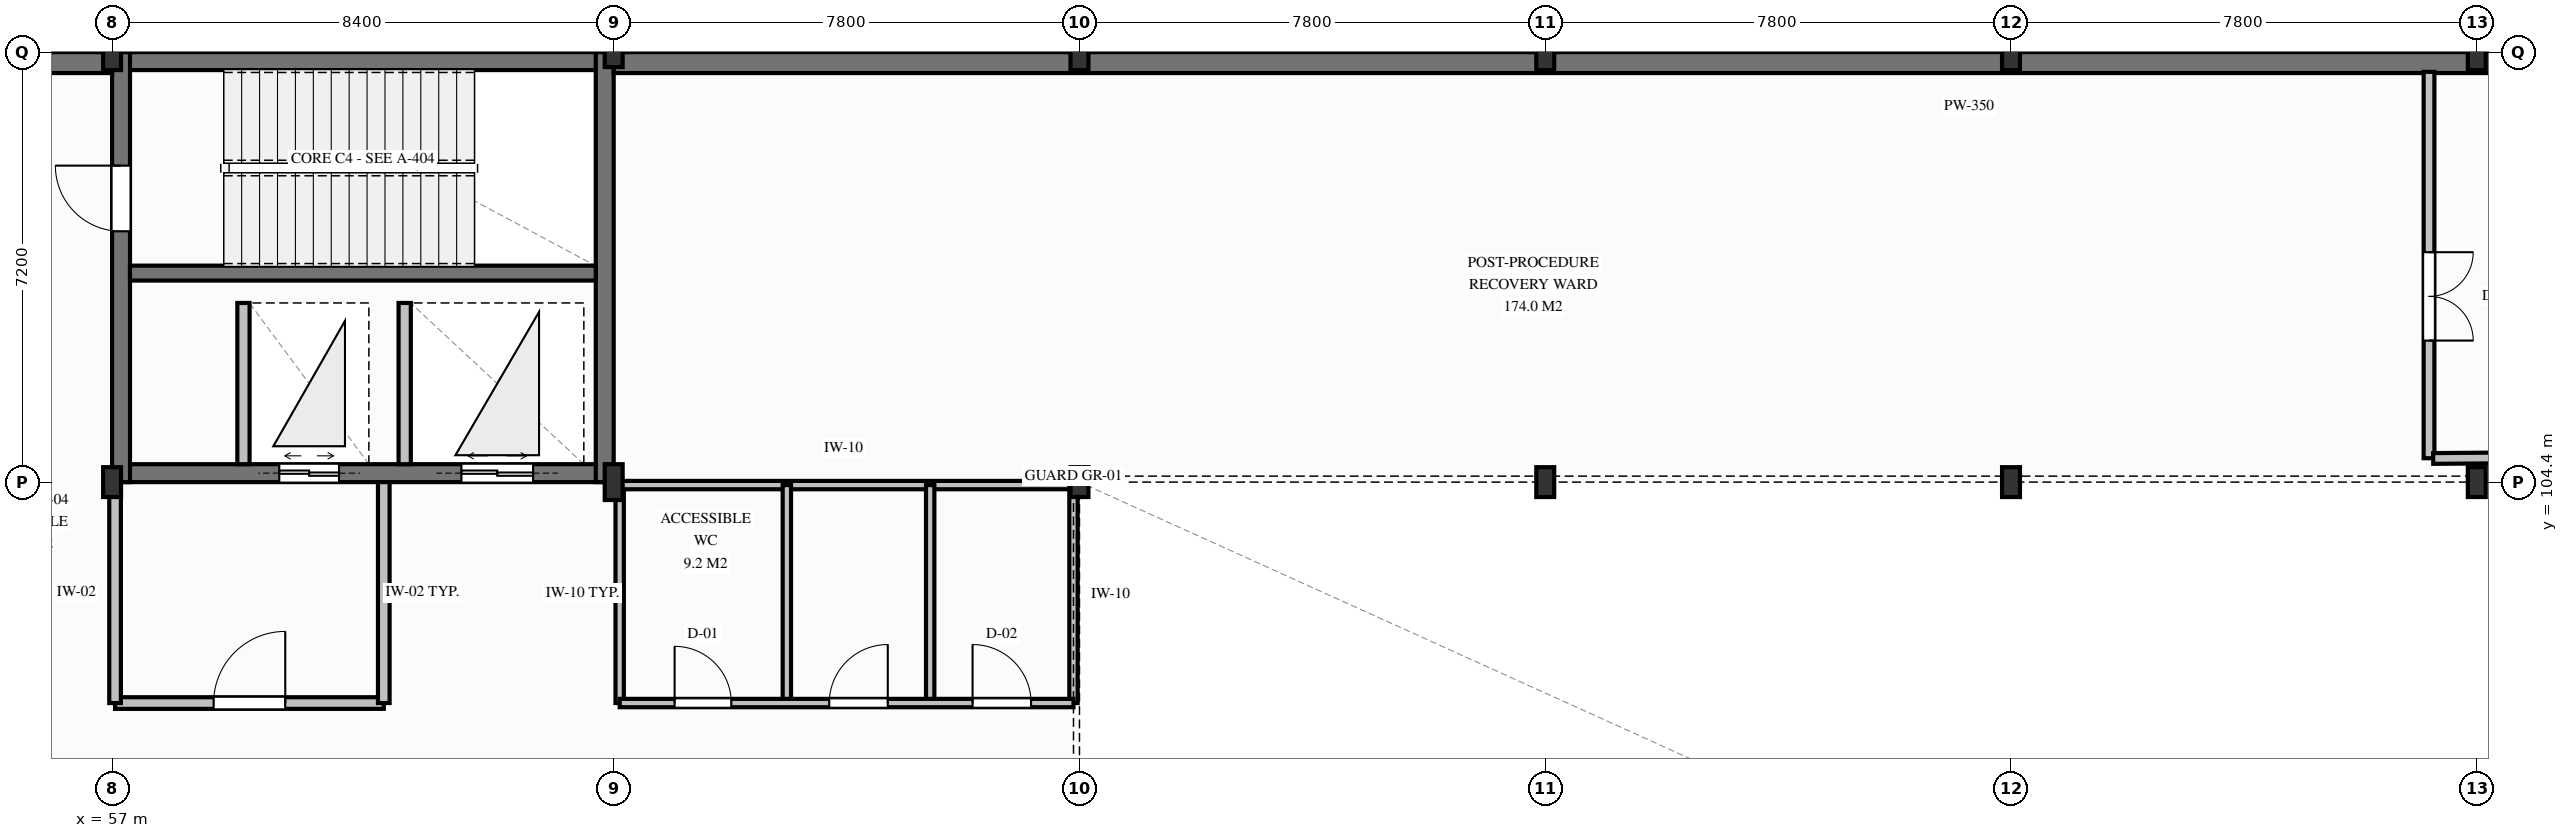
"""IFC4 building model, lengths in metres.
Left out: names, types, materials, properties, quantities, classifications, styles, units other than length and angle.
Written with IfcOpenShell. Run it as: python <this file> out.ifc"""

import sys

from ifc_helpers import new_model, si_unit, direction, frame, frame_2d, origin, origin_2d, place, context, subcontext, project, spatial, rectangle, i_section, extrude, element, fill, save


model = new_model("IFC4")
c1 = context("Model", 3, precision=1e-05, world=origin(), true_north=direction((0.0, 1.0)))
c2 = subcontext(c1, "Body", "Model", "MODEL_VIEW")
j1 = project(units=[si_unit("LENGTHUNIT", "METRE"), si_unit("PLANEANGLEUNIT", "RADIAN")], contexts=[c1])
p1 = place(None, origin())
s1 = spatial("IfcSite", under=j1, at=p1, CompositionType="ELEMENT")
p2 = place(p1, origin())
s2 = spatial("IfcBuilding", under=s1, at=p2, CompositionType="ELEMENT")
p3 = place(p2, frame((0.0, 0.0, 4.5)))
s3 = spatial("IfcBuildingStorey", under=s2, at=p3, CompositionType="ELEMENT", Elevation=4.5)
p4 = place(p3, frame((57.0, 111.45, 0.0), z_axis=(0.0, 0.0, 1.0), x_axis=(1.0, 0.0, 0.0)))
e1 = element("IfcWall", 1, at=p4, inside=s3, PredefinedType="SHEAR", context=c2, shape_type="SweptSolid", body=[
    extrude(rectangle(XDim=8.4, YDim=0.3, at=frame_2d((4.2, 0.0))), origin(), (0.0, 0.0, 1.0), 4.5),
])
p5 = place(p3, frame((57.0, 104.55, 0.0), z_axis=(0.0, 0.0, 1.0), x_axis=(1.0, 0.0, 0.0)))
e2 = element("IfcWall", 2, at=p5, inside=s3, PredefinedType="SHEAR", context=c2, shape_type="SweptSolid", body=[
    extrude(rectangle(XDim=8.4, YDim=0.3, at=frame_2d((4.2, 0.0))), origin(), (0.0, 0.0, 1.0), 4.5),
])
p6 = place(p5, frame((2.8, 0.0, 0.0)))
e3 = element("IfcOpeningElement", 3, at=p6, cuts=e2, PredefinedType="OPENING", context=c2, shape_type="SweptSolid", body=[
    extrude(rectangle(XDim=1.0, YDim=2.1, at=frame_2d((0.5, 1.05))), frame((0.0, 0.16, 0.0), z_axis=(0.0, -1.0, 0.0), x_axis=(1.0, 0.0, 0.0)), (0.0, 0.0, 1.0), 0.32),
])
p7 = place(p5, frame((5.85, 0.0, 0.0)))
e4 = element("IfcOpeningElement", 4, at=p7, cuts=e2, PredefinedType="OPENING", context=c2, shape_type="SweptSolid", body=[
    extrude(rectangle(XDim=1.2, YDim=2.15, at=frame_2d((0.6, 1.075))), frame((0.0, 0.16, 0.0), z_axis=(0.0, -1.0, 0.0), x_axis=(1.0, 0.0, 0.0)), (0.0, 0.0, 1.0), 0.32),
])
p8 = place(p3, frame((57.15, 104.4, 0.0), z_axis=(0.0, 0.0, 1.0), x_axis=(0.0, 1.0, 0.0)))
e5 = element("IfcWall", 5, at=p8, inside=s3, PredefinedType="SHEAR", context=c2, shape_type="SweptSolid", body=[
    extrude(rectangle(XDim=7.2, YDim=0.3, at=frame_2d((3.6, 0.0))), origin(), (0.0, 0.0, 1.0), 4.5),
])
p9 = place(p8, frame((4.2, 0.0, 0.0)))
e6 = element("IfcOpeningElement", 6, at=p9, cuts=e5, PredefinedType="OPENING", context=c2, shape_type="SweptSolid", body=[
    extrude(rectangle(XDim=1.1, YDim=2.15, at=frame_2d((0.55, 1.075))), frame((0.0, 0.16, 0.0), z_axis=(0.0, -1.0, 0.0), x_axis=(1.0, 0.0, 0.0)), (0.0, 0.0, 1.0), 0.32),
])
p10 = place(p3, frame((65.25, 104.4, 0.0), z_axis=(0.0, 0.0, 1.0), x_axis=(0.0, 1.0, 0.0)))
e7 = element("IfcWall", 7, at=p10, inside=s3, PredefinedType="SHEAR", context=c2, shape_type="SweptSolid", body=[
    extrude(rectangle(XDim=7.2, YDim=0.3, at=frame_2d((3.6, 0.0))), origin(), (0.0, 0.0, 1.0), 4.5),
])
p11 = place(p3, frame((57.3, 107.9, 0.0), z_axis=(0.0, 0.0, 1.0), x_axis=(1.0, 0.0, 0.0)))
e8 = element("IfcWall", 8, at=p11, inside=s3, PredefinedType="SHEAR", context=c2, shape_type="SweptSolid", body=[
    extrude(rectangle(XDim=7.8, YDim=0.25, at=frame_2d((3.9, 0.0))), origin(), (0.0, 0.0, 1.0), 4.5),
])
p12 = place(p3, frame((49.2, 111.425, 0.0), z_axis=(0.0, 0.0, 1.0), x_axis=(1.0, 0.0, 0.0)))
e9 = element("IfcWall", 9, at=p12, inside=s3, PredefinedType="SHEAR", context=c2, shape_type="SweptSolid", body=[
    extrude(rectangle(XDim=7.8, YDim=0.35, at=frame_2d((3.9, 0.0))), origin(), (0.0, 0.0, 1.0), 4.5),
])
p13 = place(p3, frame((65.4, 111.425, 0.0), z_axis=(0.0, 0.0, 1.0), x_axis=(1.0, 0.0, 0.0)))
e10 = element("IfcWall", 10, at=p13, inside=s3, PredefinedType="SHEAR", context=c2, shape_type="SweptSolid", body=[
    extrude(rectangle(XDim=48.0, YDim=0.35, at=frame_2d((24.0, 0.0))), origin(), (0.0, 0.0, 1.0), 4.5),
])
p14 = place(p3, frame((57.0, 104.4, 0.0), z_axis=(0.0, 0.0, 1.0), x_axis=(1.0, 0.0, 0.0)))
e11 = element("IfcColumn", 11, at=p14, inside=s3, PredefinedType="COLUMN", context=c2, shape_type="SweptSolid", body=[
    extrude(i_section(OverallWidth=0.3, OverallDepth=0.5, WebThickness=0.014, FlangeThickness=0.028, FilletRadius=0.027, at=origin_2d()), origin(), (0.0, 0.0, 1.0), 4.5),
])
for number, where, z_axis, x_axis in (
    (12, (57.0, 111.6, 0.0), (0.0, 0.0, 1.0), (1.0, 0.0, 0.0)),
    (13, (65.4, 104.4, 0.0), (0.0, 0.0, 1.0), (1.0, 0.0, 0.0)),
):
    element("IfcColumn", number, at=place(p3, frame(where, z_axis=z_axis, x_axis=x_axis)), inside=s3, PredefinedType="COLUMN", context=c2, shape_type="SweptSolid", body=[
        extrude(i_section(OverallWidth=0.3, OverallDepth=0.6, WebThickness=0.015, FlangeThickness=0.03, FilletRadius=0.027, at=origin_2d()), origin(), (0.0, 0.0, 1.0), 4.5),
    ])
for number, where, z_axis, x_axis in (
    (14, (65.4, 111.6, 0.0), (0.0, 0.0, 1.0), (1.0, 0.0, 0.0)),
    (15, (73.2, 104.4, 0.0), (0.0, 0.0, 1.0), (1.0, 0.0, 0.0)),
):
    element("IfcColumn", number, at=place(p3, frame(where, z_axis=z_axis, x_axis=x_axis)), inside=s3, PredefinedType="COLUMN", context=c2, shape_type="SweptSolid", body=[
        extrude(i_section(OverallWidth=0.3, OverallDepth=0.5, WebThickness=0.014, FlangeThickness=0.028, FilletRadius=0.027, at=origin_2d()), origin(), (0.0, 0.0, 1.0), 4.5),
    ])
p15 = place(p3, frame((73.2, 111.6, 0.0), z_axis=(0.0, 0.0, 1.0), x_axis=(1.0, 0.0, 0.0)))
e16 = element("IfcColumn", 16, at=p15, inside=s3, PredefinedType="COLUMN", context=c2, shape_type="SweptSolid", body=[
    extrude(i_section(OverallWidth=0.3, OverallDepth=0.6, WebThickness=0.015, FlangeThickness=0.03, FilletRadius=0.027, at=origin_2d()), origin(), (0.0, 0.0, 1.0), 4.5),
])
p16 = place(p3, frame((81.0, 104.4, 0.0), z_axis=(0.0, 0.0, 1.0), x_axis=(1.0, 0.0, 0.0)))
e17 = element("IfcColumn", 17, at=p16, inside=s3, PredefinedType="COLUMN", context=c2, shape_type="SweptSolid", body=[
    extrude(i_section(OverallWidth=0.3, OverallDepth=0.5, WebThickness=0.014, FlangeThickness=0.028, FilletRadius=0.027, at=origin_2d()), origin(), (0.0, 0.0, 1.0), 4.5),
])
p17 = place(p3, frame((81.0, 111.6, 0.0), z_axis=(0.0, 0.0, 1.0), x_axis=(1.0, 0.0, 0.0)))
e18 = element("IfcColumn", 18, at=p17, inside=s3, PredefinedType="COLUMN", context=c2, shape_type="SweptSolid", body=[
    extrude(i_section(OverallWidth=0.3, OverallDepth=0.6, WebThickness=0.015, FlangeThickness=0.03, FilletRadius=0.027, at=origin_2d()), origin(), (0.0, 0.0, 1.0), 4.5),
])
p18 = place(p3, frame((88.8, 104.4, 0.0), z_axis=(0.0, 0.0, 1.0), x_axis=(1.0, 0.0, 0.0)))
e19 = element("IfcColumn", 19, at=p18, inside=s3, PredefinedType="COLUMN", context=c2, shape_type="SweptSolid", body=[
    extrude(i_section(OverallWidth=0.3, OverallDepth=0.5, WebThickness=0.014, FlangeThickness=0.028, FilletRadius=0.027, at=origin_2d()), origin(), (0.0, 0.0, 1.0), 4.5),
])
p19 = place(p3, frame((88.8, 111.6, 0.0), z_axis=(0.0, 0.0, 1.0), x_axis=(1.0, 0.0, 0.0)))
e20 = element("IfcColumn", 20, at=p19, inside=s3, PredefinedType="COLUMN", context=c2, shape_type="SweptSolid", body=[
    extrude(i_section(OverallWidth=0.3, OverallDepth=0.6, WebThickness=0.015, FlangeThickness=0.03, FilletRadius=0.027, at=origin_2d()), origin(), (0.0, 0.0, 1.0), 4.5),
])
p20 = place(p3, frame((96.6, 104.4, 0.0), z_axis=(0.0, 0.0, 1.0), x_axis=(1.0, 0.0, 0.0)))
e21 = element("IfcColumn", 21, at=p20, inside=s3, PredefinedType="COLUMN", context=c2, shape_type="SweptSolid", body=[
    extrude(i_section(OverallWidth=0.3, OverallDepth=0.5, WebThickness=0.014, FlangeThickness=0.028, FilletRadius=0.027, at=origin_2d()), origin(), (0.0, 0.0, 1.0), 4.5),
])
p21 = place(p3, frame((96.6, 111.6, 0.0), z_axis=(0.0, 0.0, 1.0), x_axis=(1.0, 0.0, 0.0)))
e22 = element("IfcColumn", 22, at=p21, inside=s3, PredefinedType="COLUMN", context=c2, shape_type="SweptSolid", body=[
    extrude(i_section(OverallWidth=0.3, OverallDepth=0.6, WebThickness=0.015, FlangeThickness=0.03, FilletRadius=0.027, at=origin_2d()), origin(), (0.0, 0.0, 1.0), 4.5),
])
for number, where, z_axis, x_axis in (
    (23, (59.2, 104.7, 0.0), (0.0, 0.0, 1.0), (0.0, 1.0, 0.0)),
    (24, (61.9, 104.7, 0.0), (0.0, 0.0, 1.0), (0.0, 1.0, 0.0)),
):
    element("IfcWall", number, at=place(p3, frame(where, z_axis=z_axis, x_axis=x_axis)), inside=s3, PredefinedType="PARTITIONING", context=c2, shape_type="SweptSolid", body=[
        extrude(rectangle(XDim=2.7, YDim=0.205, at=frame_2d((1.35, 0.0))), origin(), (0.0, 0.0, 1.0), 3.788),
    ])
p22 = place(p3, frame((65.5, 100.7, 0.0), z_axis=(0.0, 0.0, 1.0), x_axis=(0.0, 1.0, 0.0)))
e25 = element("IfcWall", 25, at=p22, inside=s3, PredefinedType="PARTITIONING", context=c2, shape_type="SweptSolid", body=[
    extrude(rectangle(XDim=3.68, YDim=0.14, at=frame_2d((1.84, 0.0))), origin(), (0.0, 0.0, 1.0), 3.788),
])
p23 = place(p3, frame((65.4, 104.35, 0.0), z_axis=(0.0, 0.0, 1.0), x_axis=(1.0, 0.0, 0.0)))
e26 = element("IfcWall", 26, at=p23, inside=s3, PredefinedType="PARTITIONING", context=c2, shape_type="SweptSolid", body=[
    extrude(rectangle(XDim=7.7, YDim=0.14, at=frame_2d((3.85, 0.0))), origin(), (0.0, 0.0, 1.0), 3.778),
])
p24 = place(p3, frame((73.1, 100.7, 0.0), z_axis=(0.0, 0.0, 1.0), x_axis=(0.0, 1.0, 0.0)))
e27 = element("IfcWall", 27, at=p24, inside=s3, PredefinedType="PARTITIONING", context=c2, shape_type="SweptSolid", body=[
    extrude(rectangle(XDim=3.65, YDim=0.14, at=frame_2d((1.825, 0.0))), origin(), (0.0, 0.0, 1.0), 3.778),
])
for number, where, z_axis, x_axis in (
    (28, (68.3, 100.7, 0.0), (0.0, 0.0, 1.0), (0.0, 1.0, 0.0)),
    (29, (70.7, 100.7, 0.0), (0.0, 0.0, 1.0), (0.0, 1.0, 0.0)),
):
    element("IfcWall", number, at=place(p3, frame(where, z_axis=z_axis, x_axis=x_axis)), inside=s3, PredefinedType="PARTITIONING", context=c2, shape_type="SweptSolid", body=[
        extrude(rectangle(XDim=3.65, YDim=0.14, at=frame_2d((1.825, 0.0))), origin(), (0.0, 0.0, 1.0), 3.838),
    ])
p25 = place(p3, frame((65.5, 100.7, 0.0), z_axis=(0.0, 0.0, 1.0), x_axis=(1.0, 0.0, 0.0)))
e30 = element("IfcWall", 30, at=p25, inside=s3, PredefinedType="PARTITIONING", context=c2, shape_type="SweptSolid", body=[
    extrude(rectangle(XDim=7.6, YDim=0.14, at=frame_2d((3.8, 0.0))), origin(), (0.0, 0.0, 1.0), 3.778),
])
p26 = place(p25, frame((0.92, 0.0, 0.0)))
e31 = element("IfcOpeningElement", 31, at=p26, cuts=e30, PredefinedType="OPENING", context=c2, shape_type="SweptSolid", body=[
    extrude(rectangle(XDim=0.95, YDim=2.12, at=frame_2d((0.475, 1.06))), frame((0.0, 0.08, 0.0), z_axis=(0.0, -1.0, 0.0), x_axis=(1.0, 0.0, 0.0)), (0.0, 0.0, 1.0), 0.16),
])
p27 = place(p25, frame((3.51, 0.0, 0.0)))
e32 = element("IfcOpeningElement", 32, at=p27, cuts=e30, PredefinedType="OPENING", context=c2, shape_type="SweptSolid", body=[
    extrude(rectangle(XDim=0.98, YDim=2.14, at=frame_2d((0.49, 1.07))), frame((0.0, 0.08, 0.0), z_axis=(0.0, -1.0, 0.0), x_axis=(1.0, 0.0, 0.0)), (0.0, 0.0, 1.0), 0.16),
])
p28 = place(p25, frame((5.91, 0.0, 0.0)))
e33 = element("IfcOpeningElement", 33, at=p28, cuts=e30, PredefinedType="OPENING", context=c2, shape_type="SweptSolid", body=[
    extrude(rectangle(XDim=0.98, YDim=2.14, at=frame_2d((0.49, 1.07))), frame((0.0, 0.08, 0.0), z_axis=(0.0, -1.0, 0.0), x_axis=(1.0, 0.0, 0.0)), (0.0, 0.0, 1.0), 0.16),
])
p29 = place(p3, frame((57.05, 100.7, 0.0), z_axis=(0.0, 0.0, 1.0), x_axis=(1.0, 0.0, 0.0)))
e34 = element("IfcWall", 34, at=p29, inside=s3, PredefinedType="PARTITIONING", context=c2, shape_type="SweptSolid", body=[
    extrude(rectangle(XDim=4.5, YDim=0.195, at=frame_2d((2.25, 0.0))), origin(), (0.0, 0.0, 1.0), 3.778),
])
p30 = place(p29, frame((1.65, 0.0, 0.0)))
e35 = element("IfcOpeningElement", 35, at=p30, cuts=e34, PredefinedType="OPENING", context=c2, shape_type="SweptSolid", body=[
    extrude(rectangle(XDim=1.2, YDim=2.15, at=frame_2d((0.6, 1.075))), frame((0.0, 0.107, 0.0), z_axis=(0.0, -1.0, 0.0), x_axis=(1.0, 0.0, 0.0)), (0.0, 0.0, 1.0), 0.215),
])
p31 = place(p3, frame((61.55, 100.7, 0.0), z_axis=(0.0, 0.0, 1.0), x_axis=(0.0, 1.0, 0.0)))
e36 = element("IfcWall", 36, at=p31, inside=s3, PredefinedType="PARTITIONING", context=c2, shape_type="SweptSolid", body=[
    extrude(rectangle(XDim=3.7, YDim=0.195, at=frame_2d((1.85, 0.0))), origin(), (0.0, 0.0, 1.0), 3.788),
])
p32 = place(p3, frame((57.05, 100.7, 0.0), z_axis=(0.0, 0.0, 1.0), x_axis=(0.0, 1.0, 0.0)))
e37 = element("IfcWall", 37, at=p32, inside=s3, PredefinedType="PARTITIONING", context=c2, shape_type="SweptSolid", body=[
    extrude(rectangle(XDim=3.7, YDim=0.195, at=frame_2d((1.85, 0.0))), origin(), (0.0, 0.0, 1.0), 3.778),
])
p33 = place(p3, frame((95.8, 111.27, 0.0), z_axis=(0.0, 0.0, 1.0), x_axis=(0.0, -1.0, 0.0)))
e38 = element("IfcWall", 38, at=p33, inside=s3, PredefinedType="PARTITIONING", context=c2, shape_type="SweptSolid", body=[
    extrude(rectangle(XDim=6.47, YDim=0.18, at=frame_2d((3.235, 0.0))), origin(), (0.0, 0.0, 1.0), 3.928),
])
p34 = place(p33, frame((3.02, 0.0, 0.0)))
e39 = element("IfcOpeningElement", 39, at=p34, cuts=e38, PredefinedType="OPENING", context=c2, shape_type="SweptSolid", body=[
    extrude(rectangle(XDim=1.48, YDim=2.24, at=frame_2d((0.74, 1.12))), frame((0.0, 0.1, 0.0), z_axis=(0.0, -1.0, 0.0), x_axis=(1.0, 0.0, 0.0)), (0.0, 0.0, 1.0), 0.2),
])
p35 = place(p3, frame((105.38, 104.87, 0.0), z_axis=(0.0, 0.0, 1.0), x_axis=(-0.999969546458, -0.007804239631, 0.0)))
e40 = element("IfcWall", 40, at=p35, inside=s3, PredefinedType="PARTITIONING", context=c2, shape_type="SweptSolid", body=[
    extrude(rectangle(XDim=9.51, YDim=0.18, at=frame_2d((4.755, 0.0))), origin(), (0.0, 0.0, 1.0), 3.778),
])
p36 = place(p9, origin())
e41 = element("IfcDoor", 41, at=p36, inside=s3, OperationType="SINGLE_SWING_RIGHT", PredefinedType="DOOR", context=c2, shape_type="SweptSolid", body=[
    extrude(rectangle(XDim=1.1, YDim=2.15, at=frame_2d((0.55, 1.075))), frame((0.0, 0.025, 0.0), z_axis=(0.0, -1.0, 0.0), x_axis=(1.0, 0.0, 0.0)), (0.0, 0.0, 1.0), 0.05),
])
fill(e6, e41)
p37 = place(p6, origin())
e42 = element("IfcDoor", 42, at=p37, inside=s3, OperationType="DOUBLE_DOOR_SLIDING", PredefinedType="DOOR", context=c2, shape_type="SweptSolid", body=[
    extrude(rectangle(XDim=1.0, YDim=2.1, at=frame_2d((0.5, 1.05))), frame((0.0, 0.025, 0.0), z_axis=(0.0, -1.0, 0.0), x_axis=(1.0, 0.0, 0.0)), (0.0, 0.0, 1.0), 0.05),
])
fill(e3, e42)
p38 = place(p7, origin())
e43 = element("IfcDoor", 43, at=p38, inside=s3, OperationType="DOUBLE_DOOR_SLIDING", PredefinedType="DOOR", context=c2, shape_type="SweptSolid", body=[
    extrude(rectangle(XDim=1.2, YDim=2.15, at=frame_2d((0.6, 1.075))), frame((0.0, 0.025, 0.0), z_axis=(0.0, -1.0, 0.0), x_axis=(1.0, 0.0, 0.0)), (0.0, 0.0, 1.0), 0.05),
])
fill(e4, e43)
p39 = place(p26, origin())
e44 = element("IfcDoor", 44, at=p39, inside=s3, OperationType="SINGLE_SWING_LEFT", PredefinedType="DOOR", context=c2, shape_type="SweptSolid", body=[
    extrude(rectangle(XDim=0.95, YDim=2.12, at=frame_2d((0.475, 1.06))), frame((0.0, 0.025, 0.0), z_axis=(0.0, -1.0, 0.0), x_axis=(1.0, 0.0, 0.0)), (0.0, 0.0, 1.0), 0.05),
])
fill(e31, e44)
p40 = place(p27, origin())
e45 = element("IfcDoor", 45, at=p40, inside=s3, OperationType="SINGLE_SWING_RIGHT", PredefinedType="DOOR", context=c2, shape_type="SweptSolid", body=[
    extrude(rectangle(XDim=0.98, YDim=2.14, at=frame_2d((0.49, 1.07))), frame((0.0, 0.025, 0.0), z_axis=(0.0, -1.0, 0.0), x_axis=(1.0, 0.0, 0.0)), (0.0, 0.0, 1.0), 0.05),
])
fill(e32, e45)
p41 = place(p28, origin())
e46 = element("IfcDoor", 46, at=p41, inside=s3, OperationType="SINGLE_SWING_LEFT", PredefinedType="DOOR", context=c2, shape_type="SweptSolid", body=[
    extrude(rectangle(XDim=0.98, YDim=2.14, at=frame_2d((0.49, 1.07))), frame((0.0, 0.025, 0.0), z_axis=(0.0, -1.0, 0.0), x_axis=(1.0, 0.0, 0.0)), (0.0, 0.0, 1.0), 0.05),
])
fill(e33, e46)
p42 = place(p30, origin())
e47 = element("IfcDoor", 47, at=p42, inside=s3, OperationType="SINGLE_SWING_RIGHT", PredefinedType="DOOR", context=c2, shape_type="SweptSolid", body=[
    extrude(rectangle(XDim=1.2, YDim=2.15, at=frame_2d((0.6, 1.075))), frame((0.0, 0.025, 0.0), z_axis=(0.0, -1.0, 0.0), x_axis=(1.0, 0.0, 0.0)), (0.0, 0.0, 1.0), 0.05),
])
fill(e35, e47)
p43 = place(p34, origin())
e48 = element("IfcDoor", 48, at=p43, inside=s3, OperationType="DOUBLE_DOOR_SINGLE_SWING", PredefinedType="DOOR", context=c2, shape_type="SweptSolid", body=[
    extrude(rectangle(XDim=1.48, YDim=2.24, at=frame_2d((0.74, 1.12))), frame((0.0, 0.025, 0.0), z_axis=(0.0, -1.0, 0.0), x_axis=(1.0, 0.0, 0.0)), (0.0, 0.0, 1.0), 0.05),
])
fill(e39, e48)
save(model, sys.argv[1])
